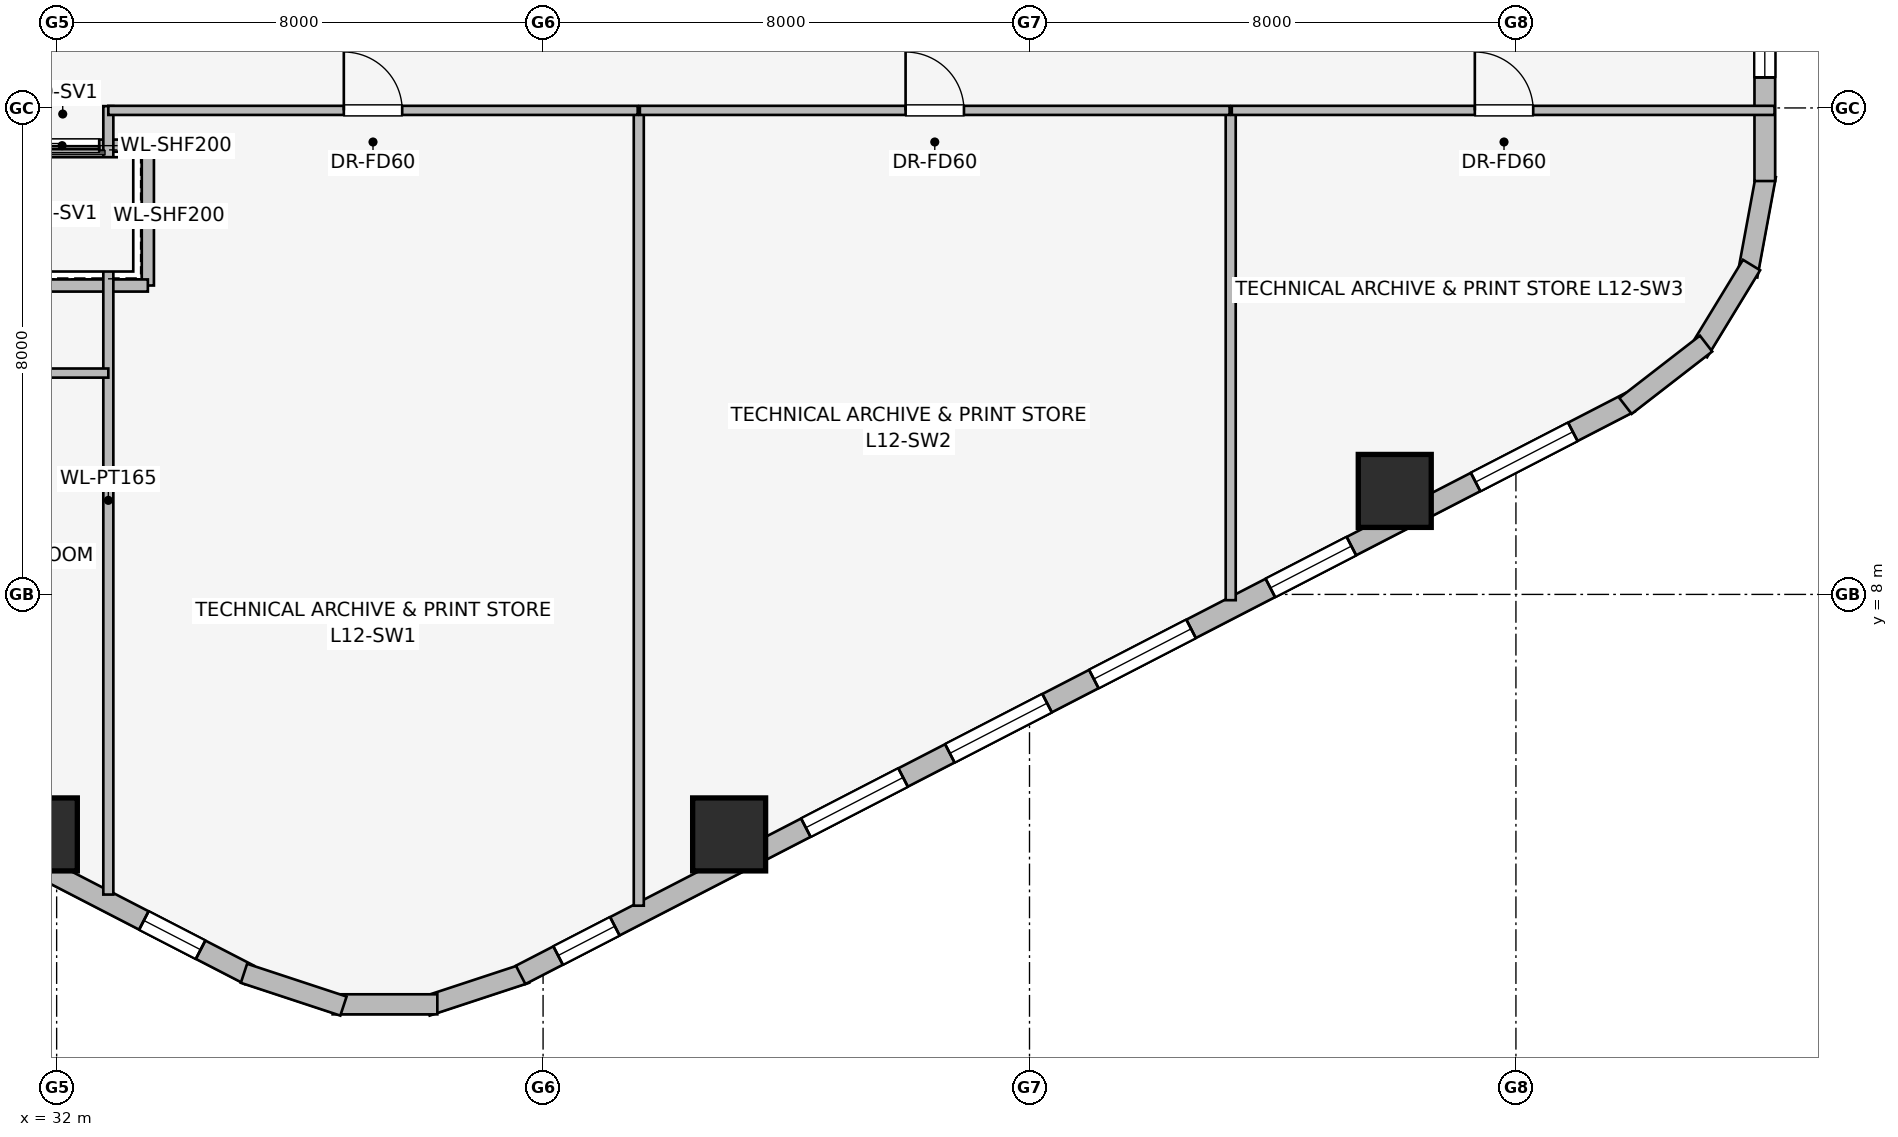
"""IFC4 building model, lengths in metres.
Left out: names, types, materials, properties, quantities, classifications, styles, units other than length and angle.
Written with IfcOpenShell. Run it as: python <this file> out.ifc"""

import sys

from ifc_helpers import new_model, si_unit, direction, frame, frame_2d, origin, origin_2d, place, context, subcontext, project, spatial, rectangle, extrude, element, fill, save


model = new_model("IFC4")
c1 = context("Model", 3, precision=1e-05, world=origin(), true_north=direction((0.0, 1.0)))
c2 = subcontext(c1, "Body", "Model", "MODEL_VIEW")
j1 = project(units=[si_unit("LENGTHUNIT", "METRE"), si_unit("PLANEANGLEUNIT", "RADIAN")], contexts=[c1])
p1 = place(None, origin())
s1 = spatial("IfcSite", under=j1, at=p1, CompositionType="ELEMENT")
p2 = place(p1, origin())
s2 = spatial("IfcBuilding", under=s1, at=p2, CompositionType="ELEMENT")
p3 = place(p2, frame((0.0, 0.0, 48.9)))
s3 = spatial("IfcBuildingStorey", under=s2, at=p3, CompositionType="ELEMENT", Elevation=48.9)
for number, where, z_axis, x_axis in (
    (1, (31.74, 4.053, 0.0), (0.0, 0.0, 1.0), (1.0, 0.0, 0.0)),
    (2, (43.06, 4.053, 0.0), (0.0, 0.0, 1.0), (1.0, 0.0, 0.0)),
    (3, (54.007, 9.702, 0.0), (0.0, 0.0, 1.0), (1.0, 0.0, 0.0)),
):
    element("IfcColumn", number, at=place(p3, frame(where, z_axis=z_axis, x_axis=x_axis)), inside=s3, PredefinedType="COLUMN", context=c2, shape_type="SweptSolid", body=[
        extrude(rectangle(XDim=1.2, YDim=1.2, at=origin_2d()), origin(), (0.0, 0.0, 1.0), 3.65),
    ])
p4 = place(p3, frame((35.169, 1.743, 0.0), z_axis=(0.0, 0.0, 1.0), x_axis=(-0.888634413993, 0.458616264721, 0.0)))
e4 = element("IfcWall", 4, at=p4, inside=s3, PredefinedType="STANDARD", context=c2, shape_type="SweptSolid", body=[
    extrude(rectangle(XDim=20.531, YDim=0.34, at=frame_2d((10.266, 0.0))), origin(), (0.0, 0.0, 1.0), 2.654),
])
p5 = place(p4, frame((0.902, 0.0, 0.75)))
e5 = element("IfcOpeningElement", 5, at=p5, cuts=e4, PredefinedType="OPENING", context=c2, shape_type="SweptSolid", body=[
    extrude(rectangle(XDim=1.05, YDim=1.4, at=frame_2d((0.525, 0.7))), frame((0.0, 0.18, 0.0), z_axis=(0.0, -1.0, 0.0), x_axis=(1.0, 0.0, 0.0)), (0.0, 0.0, 1.0), 0.36),
])
p6 = place(p4, frame((5.903, 0.0, 0.75)))
e6 = element("IfcOpeningElement", 6, at=p6, cuts=e4, PredefinedType="OPENING", context=c2, shape_type="SweptSolid", body=[
    extrude(rectangle(XDim=1.5, YDim=1.5, at=frame_2d((0.75, 0.75))), frame((0.0, 0.18, 0.0), z_axis=(0.0, -1.0, 0.0), x_axis=(1.0, 0.0, 0.0)), (0.0, 0.0, 1.0), 0.36),
])
p7 = place(p4, frame((9.516, 0.0, 0.75)))
e7 = element("IfcOpeningElement", 7, at=p7, cuts=e4, PredefinedType="OPENING", context=c2, shape_type="SweptSolid", body=[
    extrude(rectangle(XDim=1.5, YDim=1.5, at=frame_2d((0.75, 0.75))), frame((0.0, 0.18, 0.0), z_axis=(0.0, -1.0, 0.0), x_axis=(1.0, 0.0, 0.0)), (0.0, 0.0, 1.0), 0.36),
])
p8 = place(p4, frame((13.129, 0.0, 0.75)))
e8 = element("IfcOpeningElement", 8, at=p8, cuts=e4, PredefinedType="OPENING", context=c2, shape_type="SweptSolid", body=[
    extrude(rectangle(XDim=1.5, YDim=1.5, at=frame_2d((0.75, 0.75))), frame((0.0, 0.18, 0.0), z_axis=(0.0, -1.0, 0.0), x_axis=(1.0, 0.0, 0.0)), (0.0, 0.0, 1.0), 0.36),
])
p9 = place(p4, frame((17.673, 0.0, 0.75)))
e9 = element("IfcOpeningElement", 9, at=p9, cuts=e4, PredefinedType="OPENING", context=c2, shape_type="SweptSolid", body=[
    extrude(rectangle(XDim=1.8, YDim=1.5, at=frame_2d((0.9, 0.75))), frame((0.0, 0.18, 0.0), z_axis=(0.0, -1.0, 0.0), x_axis=(1.0, 0.0, 0.0)), (0.0, 0.0, 1.0), 0.36),
])
p10 = place(p3, frame((39.719, 1.769, 0.0), z_axis=(0.0, 0.0, 1.0), x_axis=(-0.94976901097, -0.312951794691, 0.0)))
e10 = element("IfcWall", 10, at=p10, inside=s3, PredefinedType="STANDARD", context=c2, shape_type="SweptSolid", body=[
    extrude(rectangle(XDim=1.722, YDim=0.33, at=frame_2d((0.861, 0.0))), origin(), (0.0, 0.0, 1.0), 3.36),
])
p11 = place(p3, frame((38.261, 1.259, 0.0), z_axis=(0.0, 0.0, 1.0), x_axis=(-1.0, 0.0, 0.0)))
e11 = element("IfcWall", 11, at=p11, inside=s3, PredefinedType="STANDARD", context=c2, shape_type="SweptSolid", body=[
    extrude(rectangle(XDim=1.722, YDim=0.33, at=frame_2d((0.861, 0.0))), origin(), (0.0, 0.0, 1.0), 3.36),
])
p12 = place(p3, frame((36.717, 1.23, 0.0), z_axis=(0.0, 0.0, 1.0), x_axis=(-0.94976901097, 0.312951794691, 0.0)))
e12 = element("IfcWall", 12, at=p12, inside=s3, PredefinedType="STANDARD", context=c2, shape_type="SweptSolid", body=[
    extrude(rectangle(XDim=1.722, YDim=0.33, at=frame_2d((0.861, 0.0))), origin(), (0.0, 0.0, 1.0), 3.36),
])
p13 = place(p3, frame((57.876, 11.159, 0.0), z_axis=(0.0, 0.0, 1.0), x_axis=(-0.888634413993, -0.458616264721, 0.0)))
e13 = element("IfcWall", 13, at=p13, inside=s3, PredefinedType="STANDARD", context=c2, shape_type="SweptSolid", body=[
    extrude(rectangle(XDim=20.531, YDim=0.34, at=frame_2d((10.266, 0.0))), origin(), (0.0, 0.0, 1.0), 2.654),
])
p14 = place(p13, frame((1.058, 0.0, 0.75)))
e14 = element("IfcOpeningElement", 14, at=p14, cuts=e13, PredefinedType="OPENING", context=c2, shape_type="SweptSolid", body=[
    extrude(rectangle(XDim=1.8, YDim=1.5, at=frame_2d((0.9, 0.75))), frame((0.0, 0.18, 0.0), z_axis=(0.0, -1.0, 0.0), x_axis=(1.0, 0.0, 0.0)), (0.0, 0.0, 1.0), 0.36),
])
p15 = place(p13, frame((5.156, 0.0, 0.75)))
e15 = element("IfcOpeningElement", 15, at=p15, cuts=e13, PredefinedType="OPENING", context=c2, shape_type="SweptSolid", body=[
    extrude(rectangle(XDim=1.5, YDim=1.5, at=frame_2d((0.75, 0.75))), frame((0.0, 0.18, 0.0), z_axis=(0.0, -1.0, 0.0), x_axis=(1.0, 0.0, 0.0)), (0.0, 0.0, 1.0), 0.36),
])
p16 = place(p13, frame((8.123, 0.0, 0.75)))
e16 = element("IfcOpeningElement", 16, at=p16, cuts=e13, PredefinedType="OPENING", context=c2, shape_type="SweptSolid", body=[
    extrude(rectangle(XDim=1.8, YDim=1.5, at=frame_2d((0.9, 0.75))), frame((0.0, 0.18, 0.0), z_axis=(0.0, -1.0, 0.0), x_axis=(1.0, 0.0, 0.0)), (0.0, 0.0, 1.0), 0.36),
])
p17 = place(p13, frame((10.788, 0.0, 0.75)))
e17 = element("IfcOpeningElement", 17, at=p17, cuts=e13, PredefinedType="OPENING", context=c2, shape_type="SweptSolid", body=[
    extrude(rectangle(XDim=1.8, YDim=1.5, at=frame_2d((0.9, 0.75))), frame((0.0, 0.18, 0.0), z_axis=(0.0, -1.0, 0.0), x_axis=(1.0, 0.0, 0.0)), (0.0, 0.0, 1.0), 0.36),
])
p18 = place(p13, frame((13.453, 0.0, 0.75)))
e18 = element("IfcOpeningElement", 18, at=p18, cuts=e13, PredefinedType="OPENING", context=c2, shape_type="SweptSolid", body=[
    extrude(rectangle(XDim=1.8, YDim=1.5, at=frame_2d((0.9, 0.75))), frame((0.0, 0.18, 0.0), z_axis=(0.0, -1.0, 0.0), x_axis=(1.0, 0.0, 0.0)), (0.0, 0.0, 1.0), 0.36),
])
p19 = place(p13, frame((18.788, 0.0, 0.75)))
e19 = element("IfcOpeningElement", 19, at=p19, cuts=e13, PredefinedType="OPENING", context=c2, shape_type="SweptSolid", body=[
    extrude(rectangle(XDim=1.05, YDim=1.4, at=frame_2d((0.525, 0.7))), frame((0.0, 0.18, 0.0), z_axis=(0.0, -1.0, 0.0), x_axis=(1.0, 0.0, 0.0)), (0.0, 0.0, 1.0), 0.36),
])
p20 = place(p3, frame((60.113, 14.892, 0.0), z_axis=(0.0, 0.0, 1.0), x_axis=(-0.181714143354, -0.983351397063, 0.0)))
e20 = element("IfcWall", 20, at=p20, inside=s3, PredefinedType="STANDARD", context=c2, shape_type="SweptSolid", body=[
    extrude(rectangle(XDim=1.678, YDim=0.33, at=frame_2d((0.839, 0.0))), origin(), (0.0, 0.0, 1.0), 3.36),
])
p21 = place(p3, frame((59.875, 13.417, 0.0), z_axis=(0.0, 0.0, 1.0), x_axis=(-0.520584129191, -0.853810379671, 0.0)))
e21 = element("IfcWall", 21, at=p21, inside=s3, PredefinedType="STANDARD", context=c2, shape_type="SweptSolid", body=[
    extrude(rectangle(XDim=1.677, YDim=0.33, at=frame_2d((0.838, 0.0))), origin(), (0.0, 0.0, 1.0), 3.36),
])
p22 = place(p3, frame((59.127, 12.125, 0.0), z_axis=(0.0, 0.0, 1.0), x_axis=(-0.790691856293, -0.61221433207, 0.0)))
e22 = element("IfcWall", 22, at=p22, inside=s3, PredefinedType="STANDARD", context=c2, shape_type="SweptSolid", body=[
    extrude(rectangle(XDim=1.676, YDim=0.33, at=frame_2d((0.838, 0.0))), origin(), (0.0, 0.0, 1.0), 3.36),
])
p23 = place(p3, frame((60.093, 33.202, 0.0), z_axis=(0.0, 0.0, 1.0), x_axis=(0.0, -1.0, 0.0)))
e23 = element("IfcWall", 23, at=p23, inside=s3, PredefinedType="STANDARD", context=c2, shape_type="SweptSolid", body=[
    extrude(rectangle(XDim=18.404, YDim=0.34, at=frame_2d((9.202, 0.0))), origin(), (0.0, 0.0, 1.0), 2.654),
])
p24 = place(p23, frame((1.744, 0.0, 0.75)))
e24 = element("IfcOpeningElement", 24, at=p24, cuts=e23, PredefinedType="OPENING", context=c2, shape_type="SweptSolid", body=[
    extrude(rectangle(XDim=1.05, YDim=1.4, at=frame_2d((0.525, 0.7))), frame((0.0, 0.18, 0.0), z_axis=(0.0, -1.0, 0.0), x_axis=(1.0, 0.0, 0.0)), (0.0, 0.0, 1.0), 0.36),
])
p25 = place(p23, frame((4.891, 0.0, 0.75)))
e25 = element("IfcOpeningElement", 25, at=p25, cuts=e23, PredefinedType="OPENING", context=c2, shape_type="SweptSolid", body=[
    extrude(rectangle(XDim=1.5, YDim=1.5, at=frame_2d((0.75, 0.75))), frame((0.0, 0.18, 0.0), z_axis=(0.0, -1.0, 0.0), x_axis=(1.0, 0.0, 0.0)), (0.0, 0.0, 1.0), 0.36),
])
p26 = place(p23, frame((8.302, 0.0, 0.75)))
e26 = element("IfcOpeningElement", 26, at=p26, cuts=e23, PredefinedType="OPENING", context=c2, shape_type="SweptSolid", body=[
    extrude(rectangle(XDim=1.8, YDim=1.5, at=frame_2d((0.9, 0.75))), frame((0.0, 0.18, 0.0), z_axis=(0.0, -1.0, 0.0), x_axis=(1.0, 0.0, 0.0)), (0.0, 0.0, 1.0), 0.36),
])
p27 = place(p23, frame((12.013, 0.0, 0.75)))
e27 = element("IfcOpeningElement", 27, at=p27, cuts=e23, PredefinedType="OPENING", context=c2, shape_type="SweptSolid", body=[
    extrude(rectangle(XDim=1.5, YDim=1.5, at=frame_2d((0.75, 0.75))), frame((0.0, 0.18, 0.0), z_axis=(0.0, -1.0, 0.0), x_axis=(1.0, 0.0, 0.0)), (0.0, 0.0, 1.0), 0.36),
])
p28 = place(p23, frame((15.65, 0.0, 0.75)))
e28 = element("IfcOpeningElement", 28, at=p28, cuts=e23, PredefinedType="OPENING", context=c2, shape_type="SweptSolid", body=[
    extrude(rectangle(XDim=1.05, YDim=1.4, at=frame_2d((0.525, 0.7))), frame((0.0, 0.18, 0.0), z_axis=(0.0, -1.0, 0.0), x_axis=(1.0, 0.0, 0.0)), (0.0, 0.0, 1.0), 0.36),
])
p29 = place(p3, frame((33.5, 15.38, 0.0), z_axis=(0.0, 0.0, 1.0), x_axis=(-1.0, 0.0, 0.0)))
e29 = element("IfcWall", 29, at=p29, inside=s3, PredefinedType="PARTITIONING", context=c2, shape_type="SweptSolid", body=[
    extrude(rectangle(XDim=2.82, YDim=0.2, at=frame_2d((1.41, 0.0))), origin(), (0.0, 0.0, 1.0), 3.36),
])
p30 = place(p29, frame((0.8, 0.0, 0.0)))
e30 = element("IfcOpeningElement", 30, at=p30, cuts=e29, PredefinedType="OPENING", context=c2, shape_type="SweptSolid", body=[
    extrude(rectangle(XDim=1.2, YDim=2.2, at=frame_2d((0.6, 1.1))), frame((0.0, 0.11, 0.0), z_axis=(0.0, -1.0, 0.0), x_axis=(1.0, 0.0, 0.0)), (0.0, 0.0, 1.0), 0.22),
])
p31 = place(p3, frame((33.5, 13.08, 0.0), z_axis=(0.0, 0.0, 1.0), x_axis=(0.0, 1.0, 0.0)))
e31 = element("IfcWall", 31, at=p31, inside=s3, PredefinedType="PARTITIONING", context=c2, shape_type="SweptSolid", body=[
    extrude(rectangle(XDim=2.3, YDim=0.2, at=frame_2d((1.15, 0.0))), origin(), (0.0, 0.0, 1.0), 3.36),
])
p32 = place(p3, frame((30.879, 13.08, 0.0), z_axis=(0.0, 0.0, 1.0), x_axis=(1.0, 0.0, 0.0)))
e32 = element("IfcWall", 32, at=p32, inside=s3, PredefinedType="PARTITIONING", context=c2, shape_type="SweptSolid", body=[
    extrude(rectangle(XDim=2.621, YDim=0.2, at=frame_2d((1.311, 0.0))), origin(), (0.0, 0.0, 1.0), 3.36),
])
p33 = place(p3, frame((32.85, 3.064, 0.0), z_axis=(0.0, 0.0, 1.0), x_axis=(0.0, 1.0, 0.0)))
e33 = element("IfcWall", 33, at=p33, inside=s3, PredefinedType="PARTITIONING", context=c2, shape_type="SweptSolid", body=[
    extrude(rectangle(XDim=12.966, YDim=0.165, at=frame_2d((6.483, 0.0))), origin(), (0.0, 0.0, 1.0), 3.36),
])
p34 = place(p3, frame((16.487, 11.64, 0.0), z_axis=(0.0, 0.0, 1.0), x_axis=(1.0, 0.0, 0.0)))
e34 = element("IfcWall", 34, at=p34, inside=s3, PredefinedType="PARTITIONING", context=c2, shape_type="SweptSolid", body=[
    extrude(rectangle(XDim=16.363, YDim=0.15, at=frame_2d((8.182, 0.0))), origin(), (0.0, 0.0, 1.0), 3.36),
])
p35 = place(p34, frame((6.513, 0.0, 0.0)))
e35 = element("IfcOpeningElement", 35, at=p35, cuts=e34, PredefinedType="OPENING", context=c2, shape_type="SweptSolid", body=[
    extrude(rectangle(XDim=0.9, YDim=2.0, at=frame_2d((0.45, 1.0))), frame((0.0, 0.085, 0.0), z_axis=(0.0, -1.0, 0.0), x_axis=(1.0, 0.0, 0.0)), (0.0, 0.0, 1.0), 0.17),
])
p36 = place(p3, frame((41.574, 2.881, 0.0), z_axis=(0.0, 0.0, 1.0), x_axis=(0.0, 1.0, 0.0)))
e36 = element("IfcWall", 36, at=p36, inside=s3, PredefinedType="PARTITIONING", context=c2, shape_type="SweptSolid", body=[
    extrude(rectangle(XDim=13.049, YDim=0.165, at=frame_2d((6.524, 0.0))), origin(), (0.0, 0.0, 1.0), 2.483),
])
p37 = place(p3, frame((51.309, 7.905, 0.0), z_axis=(0.0, 0.0, 1.0), x_axis=(0.0, 1.0, 0.0)))
e37 = element("IfcWall", 37, at=p37, inside=s3, PredefinedType="PARTITIONING", context=c2, shape_type="SweptSolid", body=[
    extrude(rectangle(XDim=8.025, YDim=0.165, at=frame_2d((4.012, 0.0))), origin(), (0.0, 0.0, 1.0), 3.36),
])
p38 = place(p3, frame((32.85, 15.96, 0.0), z_axis=(0.0, 0.0, 1.0), x_axis=(1.0, 0.0, 0.0)))
e38 = element("IfcWall", 38, at=p38, inside=s3, PredefinedType="PARTITIONING", context=c2, shape_type="SweptSolid", body=[
    extrude(rectangle(XDim=8.706, YDim=0.15, at=frame_2d((4.353, 0.0))), origin(), (0.0, 0.0, 1.0), 3.36),
])
p39 = place(p38, frame((3.873, 0.0, 0.0)))
e39 = element("IfcOpeningElement", 39, at=p39, cuts=e38, PredefinedType="OPENING", context=c2, shape_type="SweptSolid", body=[
    extrude(rectangle(XDim=0.96, YDim=2.0, at=frame_2d((0.48, 1.0))), frame((0.0, 0.085, 0.0), z_axis=(0.0, -1.0, 0.0), x_axis=(1.0, 0.0, 0.0)), (0.0, 0.0, 1.0), 0.17),
])
p40 = place(p3, frame((41.592, 15.96, 0.0), z_axis=(0.0, 0.0, 1.0), x_axis=(1.0, 0.0, 0.0)))
e40 = element("IfcWall", 40, at=p40, inside=s3, PredefinedType="PARTITIONING", context=c2, shape_type="SweptSolid", body=[
    extrude(rectangle(XDim=9.699, YDim=0.15, at=frame_2d((4.85, 0.0))), origin(), (0.0, 0.0, 1.0), 3.36),
])
p41 = place(p40, frame((4.37, 0.0, 0.0)))
e41 = element("IfcOpeningElement", 41, at=p41, cuts=e40, PredefinedType="OPENING", context=c2, shape_type="SweptSolid", body=[
    extrude(rectangle(XDim=0.96, YDim=2.0, at=frame_2d((0.48, 1.0))), frame((0.0, 0.085, 0.0), z_axis=(0.0, -1.0, 0.0), x_axis=(1.0, 0.0, 0.0)), (0.0, 0.0, 1.0), 0.17),
])
p42 = place(p3, frame((51.327, 15.96, 0.0), z_axis=(0.0, 0.0, 1.0), x_axis=(1.0, 0.0, 0.0)))
e42 = element("IfcWall", 42, at=p42, inside=s3, PredefinedType="PARTITIONING", context=c2, shape_type="SweptSolid", body=[
    extrude(rectangle(XDim=8.926, YDim=0.15, at=frame_2d((4.463, 0.0))), origin(), (0.0, 0.0, 1.0), 3.36),
])
p43 = place(p42, frame((3.997, 0.0, 0.0)))
e43 = element("IfcOpeningElement", 43, at=p43, cuts=e42, PredefinedType="OPENING", context=c2, shape_type="SweptSolid", body=[
    extrude(rectangle(XDim=0.96, YDim=2.0, at=frame_2d((0.48, 1.0))), frame((0.0, 0.085, 0.0), z_axis=(0.0, -1.0, 0.0), x_axis=(1.0, 0.0, 0.0)), (0.0, 0.0, 1.0), 0.17),
])
p44 = place(p5, origin())
e44 = element("IfcWindow", 44, at=p44, inside=s3, PartitioningType="SINGLE_PANEL", PredefinedType="WINDOW", context=c2, shape_type="SweptSolid", body=[
    extrude(rectangle(XDim=1.05, YDim=1.4, at=frame_2d((0.525, 0.7))), frame((0.0, 0.03, 0.0), z_axis=(0.0, -1.0, 0.0), x_axis=(1.0, 0.0, 0.0)), (0.0, 0.0, 1.0), 0.06),
])
fill(e5, e44)
p45 = place(p14, origin())
e45 = element("IfcWindow", 45, at=p45, inside=s3, PartitioningType="SINGLE_PANEL", PredefinedType="WINDOW", context=c2, shape_type="SweptSolid", body=[
    extrude(rectangle(XDim=1.8, YDim=1.5, at=frame_2d((0.9, 0.75))), frame((0.0, 0.03, 0.0), z_axis=(0.0, -1.0, 0.0), x_axis=(1.0, 0.0, 0.0)), (0.0, 0.0, 1.0), 0.06),
])
fill(e14, e45)
p46 = place(p15, origin())
e46 = element("IfcWindow", 46, at=p46, inside=s3, PartitioningType="SINGLE_PANEL", PredefinedType="WINDOW", context=c2, shape_type="SweptSolid", body=[
    extrude(rectangle(XDim=1.5, YDim=1.5, at=frame_2d((0.75, 0.75))), frame((0.0, 0.03, 0.0), z_axis=(0.0, -1.0, 0.0), x_axis=(1.0, 0.0, 0.0)), (0.0, 0.0, 1.0), 0.06),
])
fill(e15, e46)
p47 = place(p16, origin())
e47 = element("IfcWindow", 47, at=p47, inside=s3, PartitioningType="SINGLE_PANEL", PredefinedType="WINDOW", context=c2, shape_type="SweptSolid", body=[
    extrude(rectangle(XDim=1.8, YDim=1.5, at=frame_2d((0.9, 0.75))), frame((0.0, 0.03, 0.0), z_axis=(0.0, -1.0, 0.0), x_axis=(1.0, 0.0, 0.0)), (0.0, 0.0, 1.0), 0.06),
])
fill(e16, e47)
p48 = place(p17, origin())
e48 = element("IfcWindow", 48, at=p48, inside=s3, PartitioningType="SINGLE_PANEL", PredefinedType="WINDOW", context=c2, shape_type="SweptSolid", body=[
    extrude(rectangle(XDim=1.8, YDim=1.5, at=frame_2d((0.9, 0.75))), frame((0.0, 0.03, 0.0), z_axis=(0.0, -1.0, 0.0), x_axis=(1.0, 0.0, 0.0)), (0.0, 0.0, 1.0), 0.06),
])
fill(e17, e48)
p49 = place(p18, origin())
e49 = element("IfcWindow", 49, at=p49, inside=s3, PartitioningType="SINGLE_PANEL", PredefinedType="WINDOW", context=c2, shape_type="SweptSolid", body=[
    extrude(rectangle(XDim=1.8, YDim=1.5, at=frame_2d((0.9, 0.75))), frame((0.0, 0.03, 0.0), z_axis=(0.0, -1.0, 0.0), x_axis=(1.0, 0.0, 0.0)), (0.0, 0.0, 1.0), 0.06),
])
fill(e18, e49)
p50 = place(p19, origin())
e50 = element("IfcWindow", 50, at=p50, inside=s3, PartitioningType="SINGLE_PANEL", PredefinedType="WINDOW", context=c2, shape_type="SweptSolid", body=[
    extrude(rectangle(XDim=1.05, YDim=1.4, at=frame_2d((0.525, 0.7))), frame((0.0, 0.03, 0.0), z_axis=(0.0, -1.0, 0.0), x_axis=(1.0, 0.0, 0.0)), (0.0, 0.0, 1.0), 0.06),
])
fill(e19, e50)
p51 = place(p28, origin())
e51 = element("IfcWindow", 51, at=p51, inside=s3, PartitioningType="SINGLE_PANEL", PredefinedType="WINDOW", context=c2, shape_type="SweptSolid", body=[
    extrude(rectangle(XDim=1.05, YDim=1.4, at=frame_2d((0.525, 0.7))), frame((0.0, 0.03, 0.0), z_axis=(0.0, -1.0, 0.0), x_axis=(1.0, 0.0, 0.0)), (0.0, 0.0, 1.0), 0.06),
])
fill(e28, e51)
p52 = place(p30, origin())
e52 = element("IfcDoor", 52, at=p52, inside=s3, OperationType="SLIDING_TO_RIGHT", PredefinedType="DOOR", context=c2, shape_type="SweptSolid", body=[
    extrude(rectangle(XDim=1.2, YDim=2.2, at=frame_2d((0.6, 1.1))), frame((0.0, 0.025, 0.0), z_axis=(0.0, -1.0, 0.0), x_axis=(1.0, 0.0, 0.0)), (0.0, 0.0, 1.0), 0.05),
])
fill(e30, e52)
p53 = place(p39, origin())
e53 = element("IfcDoor", 53, at=p53, inside=s3, OperationType="SINGLE_SWING_LEFT", PredefinedType="DOOR", context=c2, shape_type="SweptSolid", body=[
    extrude(rectangle(XDim=0.96, YDim=2.0, at=frame_2d((0.48, 1.0))), frame((0.0, 0.025, 0.0), z_axis=(0.0, -1.0, 0.0), x_axis=(1.0, 0.0, 0.0)), (0.0, 0.0, 1.0), 0.05),
])
fill(e39, e53)
p54 = place(p41, origin())
e54 = element("IfcDoor", 54, at=p54, inside=s3, OperationType="SINGLE_SWING_LEFT", PredefinedType="DOOR", context=c2, shape_type="SweptSolid", body=[
    extrude(rectangle(XDim=0.96, YDim=2.0, at=frame_2d((0.48, 1.0))), frame((0.0, 0.025, 0.0), z_axis=(0.0, -1.0, 0.0), x_axis=(1.0, 0.0, 0.0)), (0.0, 0.0, 1.0), 0.05),
])
fill(e41, e54)
p55 = place(p43, origin())
e55 = element("IfcDoor", 55, at=p55, inside=s3, OperationType="SINGLE_SWING_LEFT", PredefinedType="DOOR", context=c2, shape_type="SweptSolid", body=[
    extrude(rectangle(XDim=0.96, YDim=2.0, at=frame_2d((0.48, 1.0))), frame((0.0, 0.025, 0.0), z_axis=(0.0, -1.0, 0.0), x_axis=(1.0, 0.0, 0.0)), (0.0, 0.0, 1.0), 0.05),
])
fill(e43, e55)
save(model, sys.argv[1])
